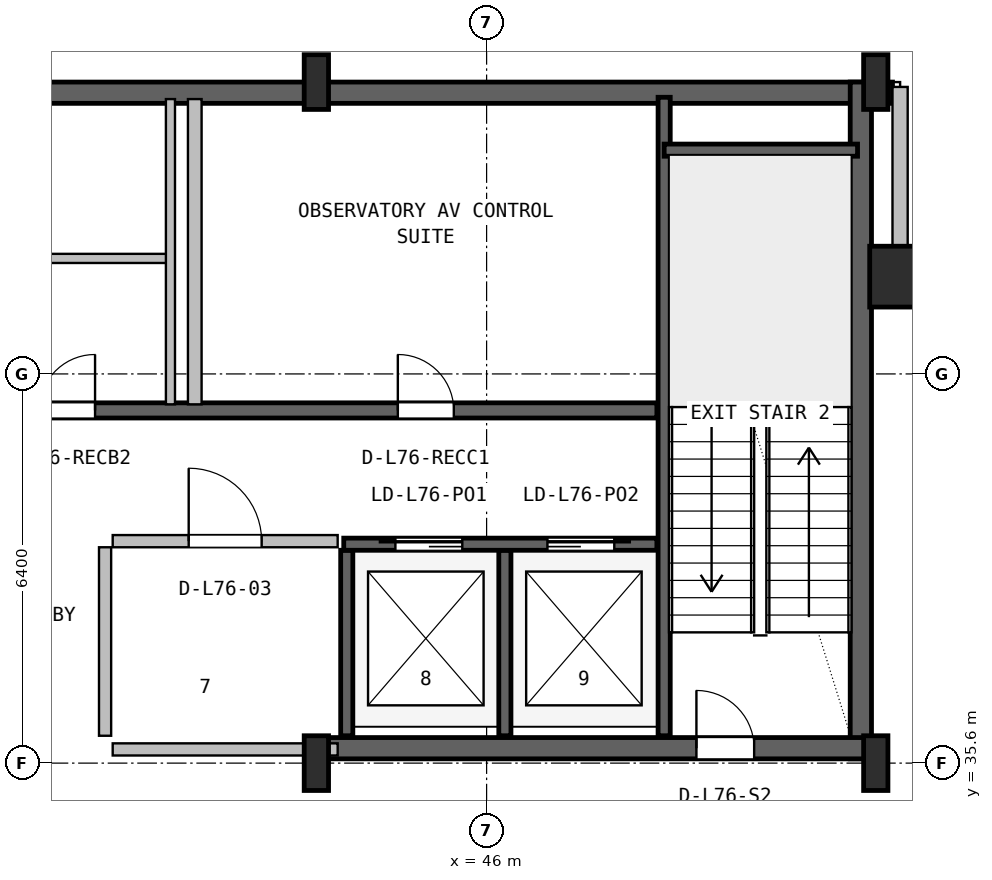
"""IFC4 building model, lengths in metres.
Left out: names, types, materials, properties, quantities, classifications, styles, units other than length and angle.
Written with IfcOpenShell. Run it as: python <this file> out.ifc"""

import sys

from ifc_helpers import new_model, si_unit, direction, frame, frame_2d, origin, origin_2d, place, context, subcontext, project, spatial, rectangle, hollow_rectangle, i_section, extrude, source, transform, mapped, element, fill, save


model = new_model("IFC4")
c1 = context("Model", 3, precision=1e-05, world=origin(), true_north=direction((0.0, 1.0)))
c2 = subcontext(c1, "Body", "Model", "MODEL_VIEW")
j1 = project(units=[si_unit("LENGTHUNIT", "METRE"), si_unit("PLANEANGLEUNIT", "RADIAN")], contexts=[c1])
p1 = place(None, origin())
s1 = spatial("IfcSite", under=j1, at=p1, CompositionType="ELEMENT")
p2 = place(p1, origin())
s2 = spatial("IfcBuilding", under=s1, at=p2, CompositionType="ELEMENT")
p3 = place(p2, frame((0.0, 0.0, 305.0)))
s3 = spatial("IfcBuildingStorey", under=s2, at=p3, CompositionType="ELEMENT", Elevation=305.0)
p4 = place(p3, frame((15.325, 46.625, 0.0), z_axis=(0.0, 0.0, 1.0), x_axis=(1.0, 0.0, 0.0)))
e1 = element("IfcWall", 1, at=p4, inside=s3, PredefinedType="SHEAR", context=c2, shape_type="SweptSolid", body=[
    extrude(rectangle(XDim=37.35, YDim=0.35, at=frame_2d((18.675, 0.0))), origin(), (0.0, 0.0, 1.0), 4.52),
])
p5 = place(p3, frame((52.155, 35.67, 0.0), z_axis=(0.0, 0.0, 1.0), x_axis=(0.0, 1.0, 0.0)))
e2 = element("IfcWall", 2, at=p5, inside=s3, PredefinedType="SHEAR", context=c2, shape_type="SweptSolid", body=[
    extrude(rectangle(XDim=11.13, YDim=0.35, at=frame_2d((5.565, 0.0))), origin(), (0.0, 0.0, 1.0), 4.52),
])
p6 = place(p3, frame((43.2, 35.845, 0.0), z_axis=(0.0, 0.0, 1.0), x_axis=(1.0, 0.0, 0.0)))
e3 = element("IfcWall", 3, at=p6, inside=s3, PredefinedType="SHEAR", context=c2, shape_type="SweptSolid", body=[
    extrude(rectangle(XDim=9.13, YDim=0.35, at=frame_2d((4.565, 0.0))), origin(), (0.0, 0.0, 1.0), 4.52),
])
p7 = place(p6, frame((6.25, 0.0, 0.0)))
e4 = element("IfcOpeningElement", 4, at=p7, cuts=e3, PredefinedType="OPENING", context=c2, shape_type="SweptSolid", body=[
    extrude(rectangle(XDim=0.95, YDim=2.1, at=frame_2d((0.475, 1.05))), frame((0.0, 0.185, 0.0), z_axis=(0.0, -1.0, 0.0), x_axis=(1.0, 0.0, 0.0)), (0.0, 0.0, 1.0), 0.37),
])
m1 = source(origin(), c2, "Body", "SweptSolid", [
    extrude(i_section(OverallWidth=0.4, OverallDepth=0.9, WebThickness=0.016, FlangeThickness=0.028, FilletRadius=0.016, at=origin_2d()), origin(), (0.0, 0.0, 1.0), 4.8),
])
for number, where, z_axis, x_axis in (
    (5, (43.2, 35.6, 0.0), (0.0, 0.0, 1.0), (1.0, 0.0, 0.0)),
    (6, (43.2, 46.8, 0.0), (0.0, 0.0, 1.0), (1.0, 0.0, 0.0)),
    (7, (52.4, 35.6, 0.0), (0.0, 0.0, 1.0), (1.0, 0.0, 0.0)),
    (8, (52.4, 46.8, 0.0), (0.0, 0.0, 1.0), (1.0, 0.0, 0.0)),
):
    element("IfcColumn", number, at=place(p3, frame(where, z_axis=z_axis, x_axis=x_axis)), inside=s3, PredefinedType="COLUMN", context=c2, shape_type="MappedRepresentation", body=[
        mapped(m1, transform((0.0, 0.0, 0.0), x_axis=(1.0, 0.0, 0.0), y_axis=(0.0, 1.0, 0.0), z_axis=(0.0, 0.0, 1.0), scale=1.0)),
    ])
m2 = source(origin(), c2, "Body", "SweptSolid", [
    extrude(hollow_rectangle(XDim=1.0, YDim=1.0, WallThickness=0.04, at=origin_2d()), origin(), (0.0, 0.0, 1.0), 4.8),
])
p8 = place(p3, frame((52.8, 43.6, 0.0), z_axis=(0.0, 0.0, 1.0), x_axis=(1.0, 0.0, 0.0)))
e9 = element("IfcColumn", 9, at=p8, inside=s3, PredefinedType="COLUMN", context=c2, shape_type="MappedRepresentation", body=[
    mapped(m2, transform((0.0, 0.0, 0.0), x_axis=(1.0, 0.0, 0.0), y_axis=(0.0, 1.0, 0.0), z_axis=(0.0, 0.0, 1.0), scale=1.0)),
])
p9 = place(p3, frame((52.93, 43.6, 0.0), z_axis=(0.0, 0.0, 1.0), x_axis=(1.0, 0.0, 0.0)))
e10 = element("IfcWall", 10, at=p9, inside=s3, PredefinedType="SOLIDWALL", context=c2, shape_type="SweptSolid", body=[
    extrude(rectangle(XDim=2.99, YDim=0.25, at=frame_2d((1.495, 0.0))), origin(), (0.0, 0.0, 1.0), 4.5),
])
p10 = place(p3, frame((52.8, 43.52, 0.0), z_axis=(0.0, 0.0, 1.0), x_axis=(0.0, 1.0, 0.0)))
e11 = element("IfcWall", 11, at=p10, inside=s3, PredefinedType="SOLIDWALL", context=c2, shape_type="SweptSolid", body=[
    extrude(rectangle(XDim=3.2, YDim=0.25, at=frame_2d((1.6, 0.0))), origin(), (0.0, 0.0, 1.0), 4.141),
])
p11 = place(p3, frame((48.92, 36.05, 0.0), z_axis=(0.0, 0.0, 1.0), x_axis=(0.0, 1.0, 0.0)))
e12 = element("IfcWall", 12, at=p11, inside=s3, PredefinedType="SHEAR", context=c2, shape_type="SweptSolid", body=[
    extrude(rectangle(XDim=10.5, YDim=0.2, at=frame_2d((5.25, 0.0))), origin(), (0.0, 0.0, 1.0), 4.52),
])
p12 = place(p3, frame((48.92, 45.68, 0.0), z_axis=(0.0, 0.0, 1.0), x_axis=(1.0, 0.0, 0.0)))
e13 = element("IfcWall", 13, at=p12, inside=s3, PredefinedType="SHEAR", context=c2, shape_type="SweptSolid", body=[
    extrude(rectangle(XDim=3.18, YDim=0.2, at=frame_2d((1.59, 0.0))), origin(), (0.0, 0.0, 1.0), 4.52),
])
p13 = place(p3, frame((24.98, 41.4, 0.0), z_axis=(0.0, 0.0, 1.0), x_axis=(1.0, 0.0, 0.0)))
e14 = element("IfcWall", 14, at=p13, inside=s3, PredefinedType="SHEAR", context=c2, shape_type="SweptSolid", body=[
    extrude(rectangle(XDim=23.82, YDim=0.25, at=frame_2d((11.91, 0.0))), origin(), (0.0, 0.0, 1.0), 4.52),
])
p14 = place(p13, frame((3.56, 0.0, 0.0)))
e15 = element("IfcOpeningElement", 15, at=p14, cuts=e14, PredefinedType="OPENING", context=c2, shape_type="SweptSolid", body=[
    extrude(rectangle(XDim=1.0, YDim=2.08, at=frame_2d((0.5, 1.04))), frame((0.0, 0.135, 0.0), z_axis=(0.0, -1.0, 0.0), x_axis=(1.0, 0.0, 0.0)), (0.0, 0.0, 1.0), 0.27),
])
p15 = place(p13, frame((9.76, 0.0, 0.0)))
e16 = element("IfcOpeningElement", 16, at=p15, cuts=e14, PredefinedType="OPENING", context=c2, shape_type="SweptSolid", body=[
    extrude(rectangle(XDim=0.92, YDim=2.08, at=frame_2d((0.46, 1.04))), frame((0.0, 0.135, 0.0), z_axis=(0.0, -1.0, 0.0), x_axis=(1.0, 0.0, 0.0)), (0.0, 0.0, 1.0), 0.27),
])
p16 = place(p13, frame((13.66, 0.0, 0.0)))
e17 = element("IfcOpeningElement", 17, at=p16, cuts=e14, PredefinedType="OPENING", context=c2, shape_type="SweptSolid", body=[
    extrude(rectangle(XDim=0.92, YDim=2.08, at=frame_2d((0.46, 1.04))), frame((0.0, 0.135, 0.0), z_axis=(0.0, -1.0, 0.0), x_axis=(1.0, 0.0, 0.0)), (0.0, 0.0, 1.0), 0.27),
])
p17 = place(p13, frame((19.56, 0.0, 0.0)))
e18 = element("IfcOpeningElement", 18, at=p17, cuts=e14, PredefinedType="OPENING", context=c2, shape_type="SweptSolid", body=[
    extrude(rectangle(XDim=0.92, YDim=2.08, at=frame_2d((0.46, 1.04))), frame((0.0, 0.135, 0.0), z_axis=(0.0, -1.0, 0.0), x_axis=(1.0, 0.0, 0.0)), (0.0, 0.0, 1.0), 0.27),
])
for number, where, z_axis, x_axis in (
    (19, (43.7, 36.05, 0.0), (0.0, 0.0, 1.0), (0.0, 1.0, 0.0)),
    (20, (46.3, 36.05, 0.0), (0.0, 0.0, 1.0), (0.0, 1.0, 0.0)),
):
    element("IfcWall", number, at=place(p3, frame(where, z_axis=z_axis, x_axis=x_axis)), inside=s3, PredefinedType="SHEAR", context=c2, shape_type="SweptSolid", body=[
        extrude(rectangle(XDim=3.05, YDim=0.2, at=frame_2d((1.525, 0.0))), origin(), (0.0, 0.0, 1.0), 4.52),
    ])
p18 = place(p3, frame((43.65, 39.2, 0.0), z_axis=(0.0, 0.0, 1.0), x_axis=(1.0, 0.0, 0.0)))
e21 = element("IfcWall", 21, at=p18, inside=s3, PredefinedType="SHEAR", context=c2, shape_type="SweptSolid", body=[
    extrude(rectangle(XDim=5.15, YDim=0.2, at=frame_2d((2.575, 0.0))), origin(), (0.0, 0.0, 1.0), 4.52),
])
p19 = place(p18, frame((0.85, 0.0, 0.0)))
e22 = element("IfcOpeningElement", 22, at=p19, cuts=e21, PredefinedType="OPENING", context=c2, shape_type="SweptSolid", body=[
    extrude(rectangle(XDim=1.1, YDim=2.18, at=frame_2d((0.55, 1.09))), frame((0.0, 0.11, 0.0), z_axis=(0.0, -1.0, 0.0), x_axis=(1.0, 0.0, 0.0)), (0.0, 0.0, 1.0), 0.22),
])
p20 = place(p18, frame((3.35, 0.0, 0.0)))
e23 = element("IfcOpeningElement", 23, at=p20, cuts=e21, PredefinedType="OPENING", context=c2, shape_type="SweptSolid", body=[
    extrude(rectangle(XDim=1.1, YDim=2.18, at=frame_2d((0.55, 1.09))), frame((0.0, 0.11, 0.0), z_axis=(0.0, -1.0, 0.0), x_axis=(1.0, 0.0, 0.0)), (0.0, 0.0, 1.0), 0.22),
])
p21 = place(p3, frame((39.85, 35.825, 0.0), z_axis=(0.0, 0.0, 1.0), x_axis=(1.0, 0.0, 0.0)))
e24 = element("IfcWall", 24, at=p21, inside=s3, PredefinedType="SOLIDWALL", context=c2, shape_type="SweptSolid", body=[
    extrude(rectangle(XDim=3.7, YDim=0.2, at=frame_2d((1.85, 0.0))), origin(), (0.0, 0.0, 1.0), 3.545),
])
p22 = place(p3, frame((39.85, 39.25, 0.0), z_axis=(0.0, 0.0, 1.0), x_axis=(1.0, 0.0, 0.0)))
e25 = element("IfcWall", 25, at=p22, inside=s3, PredefinedType="SOLIDWALL", context=c2, shape_type="SweptSolid", body=[
    extrude(rectangle(XDim=3.7, YDim=0.2, at=frame_2d((1.85, 0.0))), origin(), (0.0, 0.0, 1.0), 4.5),
])
p23 = place(p22, frame((1.25, 0.0, 0.0)))
e26 = element("IfcOpeningElement", 26, at=p23, cuts=e25, PredefinedType="OPENING", context=c2, shape_type="SweptSolid", body=[
    extrude(rectangle(XDim=1.2, YDim=2.1, at=frame_2d((0.6, 1.05))), frame((0.0, 0.11, 0.0), z_axis=(0.0, -1.0, 0.0), x_axis=(1.0, 0.0, 0.0)), (0.0, 0.0, 1.0), 0.22),
])
p24 = place(p3, frame((39.725, 36.05, 0.0), z_axis=(0.0, 0.0, 1.0), x_axis=(0.0, 1.0, 0.0)))
e27 = element("IfcWall", 27, at=p24, inside=s3, PredefinedType="SOLIDWALL", context=c2, shape_type="SweptSolid", body=[
    extrude(rectangle(XDim=3.1, YDim=0.2, at=frame_2d((1.55, 0.0))), origin(), (0.0, 0.0, 1.0), 4.5),
])
p25 = place(p3, frame((37.2, 43.9, 0.0), z_axis=(0.0, 0.0, 1.0), x_axis=(1.0, 0.0, 0.0)))
e28 = element("IfcWall", 28, at=p25, inside=s3, PredefinedType="PARTITIONING", context=c2, shape_type="SweptSolid", body=[
    extrude(rectangle(XDim=3.6, YDim=0.15, at=frame_2d((1.8, 0.0))), origin(), (0.0, 0.0, 1.0), 4.5),
])
p26 = place(p3, frame((40.8, 41.5, 0.0), z_axis=(0.0, 0.0, 1.0), x_axis=(0.0, 1.0, 0.0)))
e29 = element("IfcWall", 29, at=p26, inside=s3, PredefinedType="PARTITIONING", context=c2, shape_type="SweptSolid", body=[
    extrude(rectangle(XDim=5.02, YDim=0.15, at=frame_2d((2.51, 0.0))), origin(), (0.0, 0.0, 1.0), 4.5),
])
p27 = place(p3, frame((41.2, 41.5, 0.0), z_axis=(0.0, 0.0, 1.0), x_axis=(0.0, 1.0, 0.0)))
e30 = element("IfcWall", 30, at=p27, inside=s3, PredefinedType="PARTITIONING", context=c2, shape_type="SweptSolid", body=[
    extrude(rectangle(XDim=5.02, YDim=0.225, at=frame_2d((2.51, 0.0))), origin(), (0.0, 0.0, 1.0), 4.5),
])
m3 = source(origin(), c2, "Body", "SweptSolid", [
    extrude(rectangle(XDim=0.95, YDim=2.1, at=frame_2d((0.475, 1.05))), frame((0.0, 0.025, 0.0), z_axis=(0.0, -1.0, 0.0), x_axis=(1.0, 0.0, 0.0)), (0.0, 0.0, 1.0), 0.05),
])
p28 = place(p7, origin())
e31 = element("IfcDoor", 31, at=p28, inside=s3, OperationType="SINGLE_SWING_LEFT", PredefinedType="DOOR", context=c2, shape_type="MappedRepresentation", body=[
    mapped(m3, transform((0.0, 0.0, 0.0), x_axis=(1.0, 0.0, 0.0), y_axis=(0.0, 1.0, 0.0), z_axis=(0.0, 0.0, 1.0), scale=1.0)),
])
fill(e4, e31)
m4 = source(origin(), c2, "Body", "SweptSolid", [
    extrude(rectangle(XDim=0.92, YDim=2.08, at=frame_2d((0.46, 1.04))), frame((0.0, 0.025, 0.0), z_axis=(0.0, -1.0, 0.0), x_axis=(1.0, 0.0, 0.0)), (0.0, 0.0, 1.0), 0.05),
])
p29 = place(p16, origin())
e32 = element("IfcDoor", 32, at=p29, inside=s3, OperationType="SINGLE_SWING_RIGHT", PredefinedType="DOOR", context=c2, shape_type="MappedRepresentation", body=[
    mapped(m4, transform((0.0, 0.0, 0.0), x_axis=(1.0, 0.0, 0.0), y_axis=(0.0, 1.0, 0.0), z_axis=(0.0, 0.0, 1.0), scale=1.0)),
])
fill(e17, e32)
p30 = place(p17, origin())
e33 = element("IfcDoor", 33, at=p30, inside=s3, OperationType="SINGLE_SWING_LEFT", PredefinedType="DOOR", context=c2, shape_type="MappedRepresentation", body=[
    mapped(m4, transform((0.0, 0.0, 0.0), x_axis=(1.0, 0.0, 0.0), y_axis=(0.0, 1.0, 0.0), z_axis=(0.0, 0.0, 1.0), scale=1.0)),
])
fill(e18, e33)
m5 = source(origin(), c2, "Body", "SweptSolid", [
    extrude(rectangle(XDim=1.1, YDim=2.18, at=frame_2d((0.55, 1.09))), frame((0.0, 0.025, 0.0), z_axis=(0.0, -1.0, 0.0), x_axis=(1.0, 0.0, 0.0)), (0.0, 0.0, 1.0), 0.05),
])
p31 = place(p19, origin())
e34 = element("IfcDoor", 34, at=p31, inside=s3, OperationType="SLIDING_TO_LEFT", PredefinedType="DOOR", context=c2, shape_type="MappedRepresentation", body=[
    mapped(m5, transform((0.0, 0.0, 0.0), x_axis=(1.0, 0.0, 0.0), y_axis=(0.0, 1.0, 0.0), z_axis=(0.0, 0.0, 1.0), scale=1.0)),
])
fill(e22, e34)
p32 = place(p20, origin())
e35 = element("IfcDoor", 35, at=p32, inside=s3, OperationType="SLIDING_TO_RIGHT", PredefinedType="DOOR", context=c2, shape_type="MappedRepresentation", body=[
    mapped(m5, transform((0.0, 0.0, 0.0), x_axis=(1.0, 0.0, 0.0), y_axis=(0.0, 1.0, 0.0), z_axis=(0.0, 0.0, 1.0), scale=1.0)),
])
fill(e23, e35)
m6 = source(origin(), c2, "Body", "SweptSolid", [
    extrude(rectangle(XDim=1.2, YDim=2.1, at=frame_2d((0.6, 1.05))), frame((0.0, 0.025, 0.0), z_axis=(0.0, -1.0, 0.0), x_axis=(1.0, 0.0, 0.0)), (0.0, 0.0, 1.0), 0.05),
])
p33 = place(p23, origin())
e36 = element("IfcDoor", 36, at=p33, inside=s3, OperationType="SINGLE_SWING_LEFT", PredefinedType="DOOR", context=c2, shape_type="MappedRepresentation", body=[
    mapped(m6, transform((0.0, 0.0, 0.0), x_axis=(1.0, 0.0, 0.0), y_axis=(0.0, 1.0, 0.0), z_axis=(0.0, 0.0, 1.0), scale=1.0)),
])
fill(e26, e36)
save(model, sys.argv[1])
